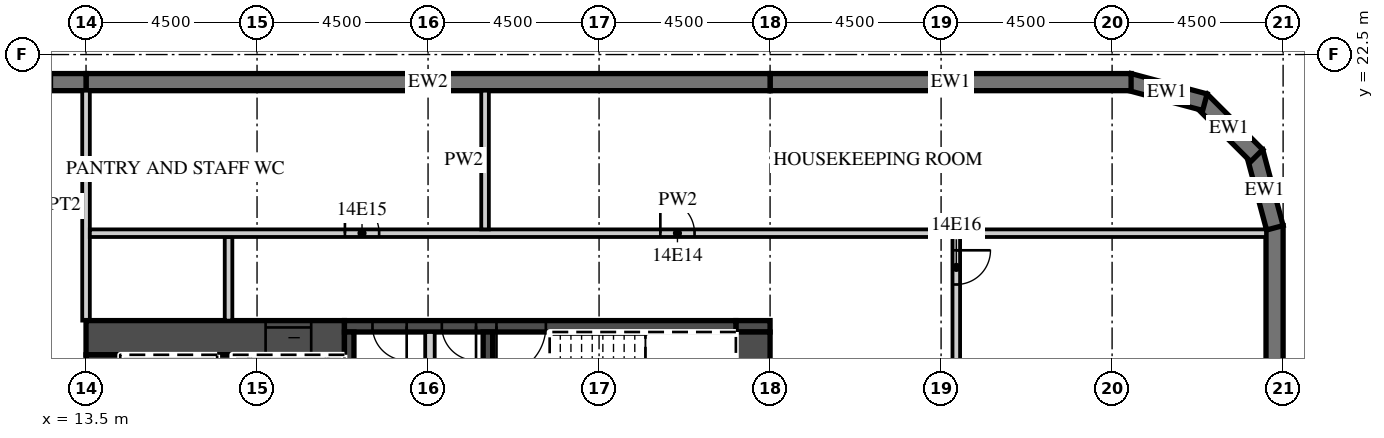
"""IFC4 building model, lengths in metres.
Left out: names, types, materials, properties, quantities, classifications, styles, units other than length and angle.
Written with IfcOpenShell. Run it as: python <this file> out.ifc"""

import sys

from ifc_helpers import new_model, si_unit, direction, frame, frame_2d, origin, place, context, subcontext, project, spatial, polyline, rectangle, outline, extrude, element, fill, save


model = new_model("IFC4")
c1 = context("Model", 3, precision=1e-05, world=origin(), true_north=direction((0.0, 1.0)))
c2 = subcontext(c1, "Body", "Model", "MODEL_VIEW")
j1 = project(units=[si_unit("LENGTHUNIT", "METRE"), si_unit("PLANEANGLEUNIT", "RADIAN")], contexts=[c1])
p1 = place(None, origin())
s1 = spatial("IfcSite", under=j1, at=p1, CompositionType="ELEMENT")
p2 = place(p1, origin())
s2 = spatial("IfcBuilding", under=s1, at=p2, CompositionType="ELEMENT")
p3 = place(p2, frame((0.0, 0.0, 76.5)))
s3 = spatial("IfcBuildingStorey", under=s2, at=p3, CompositionType="ELEMENT", Elevation=76.5)
p4 = place(p3, frame((44.775, -18.0, 0.0), z_axis=(0.0, 0.0, 1.0), x_axis=(0.0, 1.0, 0.0)))
e1 = element("IfcWall", 1, at=p4, inside=s3, PredefinedType="SOLIDWALL", context=c2, shape_type="SweptSolid", body=[
    extrude(rectangle(XDim=36.0, YDim=0.45, at=frame_2d((18.0, 0.0))), origin(), (0.0, 0.0, 1.0), 3.02),
])
p5 = place(p4, frame((3.9, 0.0, 0.45)))
e2 = element("IfcOpeningElement", 2, at=p5, cuts=e1, PredefinedType="OPENING", context=c2, shape_type="SweptSolid", body=[
    extrude(rectangle(XDim=3.3, YDim=2.25, at=frame_2d((1.65, 1.125))), frame((0.0, 0.235, 0.0), z_axis=(0.0, -1.0, 0.0), x_axis=(1.0, 0.0, 0.0)), (0.0, 0.0, 1.0), 0.47),
])
p6 = place(p4, frame((8.4, 0.0, 0.45)))
e3 = element("IfcOpeningElement", 3, at=p6, cuts=e1, PredefinedType="OPENING", context=c2, shape_type="SweptSolid", body=[
    extrude(rectangle(XDim=3.3, YDim=2.25, at=frame_2d((1.65, 1.125))), frame((0.0, 0.235, 0.0), z_axis=(0.0, -1.0, 0.0), x_axis=(1.0, 0.0, 0.0)), (0.0, 0.0, 1.0), 0.47),
])
p7 = place(p4, frame((12.9, 0.0, 0.45)))
e4 = element("IfcOpeningElement", 4, at=p7, cuts=e1, PredefinedType="OPENING", context=c2, shape_type="SweptSolid", body=[
    extrude(rectangle(XDim=3.3, YDim=2.25, at=frame_2d((1.65, 1.125))), frame((0.0, 0.235, 0.0), z_axis=(0.0, -1.0, 0.0), x_axis=(1.0, 0.0, 0.0)), (0.0, 0.0, 1.0), 0.47),
])
p8 = place(p3, frame((44.783, 17.942, 0.0), z_axis=(0.0, 0.0, 1.0), x_axis=(-0.25881466832, 0.965926999034, 0.0)))
e5 = element("IfcWall", 5, at=p8, inside=s3, PredefinedType="SOLIDWALL", context=c2, shape_type="SweptSolid", body=[
    extrude(outline(polyline([(0.0, -0.225), (2.071, -0.225), (1.95, 0.225), (0.121, 0.225), (0.0, -0.225)])), origin(), (0.0, 0.0, 1.0), 3.02),
])
p9 = place(p3, frame((44.305, 19.841, 0.0), z_axis=(0.0, 0.0, 1.0), x_axis=(-0.707106781187, 0.707106781187, 0.0)))
e6 = element("IfcWall", 6, at=p9, inside=s3, PredefinedType="SOLIDWALL", context=c2, shape_type="SweptSolid", body=[
    extrude(outline(polyline([(0.0, -0.225), (2.071, -0.225), (1.95, 0.225), (0.121, 0.225), (0.0, -0.225)])), origin(), (0.0, 0.0, 1.0), 3.02),
])
p10 = place(p3, frame((42.942, 21.247, 0.0), z_axis=(0.0, 0.0, 1.0), x_axis=(-0.965926999034, 0.25881466832, 0.0)))
e7 = element("IfcWall", 7, at=p10, inside=s3, PredefinedType="SOLIDWALL", context=c2, shape_type="SweptSolid", body=[
    extrude(outline(polyline([(-0.0, -0.225), (2.07, -0.225), (1.95, 0.225), (0.12, 0.225), (-0.0, -0.225)])), origin(), (0.0, 0.0, 1.0), 3.02),
])
p11 = place(p3, frame((41.0, 21.775, 0.0), z_axis=(0.0, 0.0, 1.0), x_axis=(-1.0, 0.0, 0.0)))
e8 = element("IfcWall", 8, at=p11, inside=s3, PredefinedType="SOLIDWALL", context=c2, shape_type="SweptSolid", body=[
    extrude(rectangle(XDim=9.5, YDim=0.45, at=frame_2d((4.75, 0.0))), origin(), (0.0, 0.0, 1.0), 3.02),
])
p12 = place(p3, frame((31.5, 21.775, 0.0), z_axis=(0.0, 0.0, 1.0), x_axis=(-1.0, 0.0, 0.0)))
e9 = element("IfcWall", 9, at=p12, inside=s3, PredefinedType="SOLIDWALL", context=c2, shape_type="SweptSolid", body=[
    extrude(rectangle(XDim=18.0, YDim=0.45, at=frame_2d((9.0, 0.0))), origin(), (0.0, 0.0, 1.0), 3.02),
])
p13 = place(p3, frame((13.5, 21.775, 0.0), z_axis=(0.0, 0.0, 1.0), x_axis=(-1.0, 0.0, 0.0)))
e10 = element("IfcWall", 10, at=p13, inside=s3, PredefinedType="SOLIDWALL", context=c2, shape_type="SweptSolid", body=[
    extrude(rectangle(XDim=54.5, YDim=0.45, at=frame_2d((27.25, 0.0))), origin(), (0.0, 0.0, 1.0), 3.02),
])
p14 = place(p13, frame((0.9, 0.0, 0.45)))
e11 = element("IfcOpeningElement", 11, at=p14, cuts=e10, PredefinedType="OPENING", context=c2, shape_type="SweptSolid", body=[
    extrude(rectangle(XDim=2.7, YDim=2.25, at=frame_2d((1.35, 1.125))), frame((0.0, 0.235, 0.0), z_axis=(0.0, -1.0, 0.0), x_axis=(1.0, 0.0, 0.0)), (0.0, 0.0, 1.0), 0.47),
])
p15 = place(p13, frame((5.4, 0.0, 0.45)))
e12 = element("IfcOpeningElement", 12, at=p15, cuts=e10, PredefinedType="OPENING", context=c2, shape_type="SweptSolid", body=[
    extrude(rectangle(XDim=2.7, YDim=2.25, at=frame_2d((1.35, 1.125))), frame((0.0, 0.235, 0.0), z_axis=(0.0, -1.0, 0.0), x_axis=(1.0, 0.0, 0.0)), (0.0, 0.0, 1.0), 0.47),
])
p16 = place(p13, frame((9.9, 0.0, 0.45)))
e13 = element("IfcOpeningElement", 13, at=p16, cuts=e10, PredefinedType="OPENING", context=c2, shape_type="SweptSolid", body=[
    extrude(rectangle(XDim=2.7, YDim=2.25, at=frame_2d((1.35, 1.125))), frame((0.0, 0.235, 0.0), z_axis=(0.0, -1.0, 0.0), x_axis=(1.0, 0.0, 0.0)), (0.0, 0.0, 1.0), 0.47),
])
p17 = place(p13, frame((14.4, 0.0, 0.45)))
e14 = element("IfcOpeningElement", 14, at=p17, cuts=e10, PredefinedType="OPENING", context=c2, shape_type="SweptSolid", body=[
    extrude(rectangle(XDim=2.7, YDim=2.25, at=frame_2d((1.35, 1.125))), frame((0.0, 0.235, 0.0), z_axis=(0.0, -1.0, 0.0), x_axis=(1.0, 0.0, 0.0)), (0.0, 0.0, 1.0), 0.47),
])
p18 = place(p13, frame((18.9, 0.0, 0.45)))
e15 = element("IfcOpeningElement", 15, at=p18, cuts=e10, PredefinedType="OPENING", context=c2, shape_type="SweptSolid", body=[
    extrude(rectangle(XDim=2.7, YDim=2.25, at=frame_2d((1.35, 1.125))), frame((0.0, 0.235, 0.0), z_axis=(0.0, -1.0, 0.0), x_axis=(1.0, 0.0, 0.0)), (0.0, 0.0, 1.0), 0.47),
])
p19 = place(p13, frame((23.4, 0.0, 0.45)))
e16 = element("IfcOpeningElement", 16, at=p19, cuts=e10, PredefinedType="OPENING", context=c2, shape_type="SweptSolid", body=[
    extrude(rectangle(XDim=2.7, YDim=2.25, at=frame_2d((1.35, 1.125))), frame((0.0, 0.235, 0.0), z_axis=(0.0, -1.0, 0.0), x_axis=(1.0, 0.0, 0.0)), (0.0, 0.0, 1.0), 0.47),
])
p20 = place(p13, frame((27.9, 0.0, 0.45)))
e17 = element("IfcOpeningElement", 17, at=p20, cuts=e10, PredefinedType="OPENING", context=c2, shape_type="SweptSolid", body=[
    extrude(rectangle(XDim=2.7, YDim=2.25, at=frame_2d((1.35, 1.125))), frame((0.0, 0.235, 0.0), z_axis=(0.0, -1.0, 0.0), x_axis=(1.0, 0.0, 0.0)), (0.0, 0.0, 1.0), 0.47),
])
p21 = place(p13, frame((32.4, 0.0, 0.45)))
e18 = element("IfcOpeningElement", 18, at=p21, cuts=e10, PredefinedType="OPENING", context=c2, shape_type="SweptSolid", body=[
    extrude(rectangle(XDim=2.7, YDim=2.25, at=frame_2d((1.35, 1.125))), frame((0.0, 0.235, 0.0), z_axis=(0.0, -1.0, 0.0), x_axis=(1.0, 0.0, 0.0)), (0.0, 0.0, 1.0), 0.47),
])
p22 = place(p13, frame((36.9, 0.0, 0.45)))
e19 = element("IfcOpeningElement", 19, at=p22, cuts=e10, PredefinedType="OPENING", context=c2, shape_type="SweptSolid", body=[
    extrude(rectangle(XDim=2.7, YDim=2.25, at=frame_2d((1.35, 1.125))), frame((0.0, 0.235, 0.0), z_axis=(0.0, -1.0, 0.0), x_axis=(1.0, 0.0, 0.0)), (0.0, 0.0, 1.0), 0.47),
])
p23 = place(p13, frame((41.4, 0.0, 0.45)))
e20 = element("IfcOpeningElement", 20, at=p23, cuts=e10, PredefinedType="OPENING", context=c2, shape_type="SweptSolid", body=[
    extrude(rectangle(XDim=2.7, YDim=2.25, at=frame_2d((1.35, 1.125))), frame((0.0, 0.235, 0.0), z_axis=(0.0, -1.0, 0.0), x_axis=(1.0, 0.0, 0.0)), (0.0, 0.0, 1.0), 0.47),
])
p24 = place(p13, frame((45.9, 0.0, 0.45)))
e21 = element("IfcOpeningElement", 21, at=p24, cuts=e10, PredefinedType="OPENING", context=c2, shape_type="SweptSolid", body=[
    extrude(rectangle(XDim=2.7, YDim=2.25, at=frame_2d((1.35, 1.125))), frame((0.0, 0.235, 0.0), z_axis=(0.0, -1.0, 0.0), x_axis=(1.0, 0.0, 0.0)), (0.0, 0.0, 1.0), 0.47),
])
p25 = place(p13, frame((50.4, 0.0, 0.45)))
e22 = element("IfcOpeningElement", 22, at=p25, cuts=e10, PredefinedType="OPENING", context=c2, shape_type="SweptSolid", body=[
    extrude(rectangle(XDim=2.7, YDim=2.25, at=frame_2d((1.35, 1.125))), frame((0.0, 0.235, 0.0), z_axis=(0.0, -1.0, 0.0), x_axis=(1.0, 0.0, 0.0)), (0.0, 0.0, 1.0), 0.47),
])
p26 = place(p3, frame((13.5, 15.5, 0.0), z_axis=(0.0, 0.0, 1.0), x_axis=(0.0, 1.0, 0.0)))
e23 = element("IfcWall", 23, at=p26, inside=s3, PredefinedType="PARTITIONING", context=c2, shape_type="SweptSolid", body=[
    extrude(rectangle(XDim=6.05, YDim=0.2, at=frame_2d((3.025, 0.0))), origin(), (0.0, 0.0, 1.0), 3.02),
])
p27 = place(p3, frame((13.5, 15.05, 0.0), z_axis=(0.0, 0.0, 1.0), x_axis=(1.0, 0.0, 0.0)))
e24 = element("IfcWall", 24, at=p27, inside=s3, PredefinedType="SHEAR", context=c2, shape_type="SweptSolid", body=[
    extrude(rectangle(XDim=6.8, YDim=0.9, at=frame_2d((3.4, 0.0))), origin(), (0.0, 0.0, 1.0), 3.02),
])
p28 = place(p27, frame((4.725, 0.0, 0.0)))
e25 = element("IfcOpeningElement", 25, at=p28, cuts=e24, PredefinedType="OPENING", context=c2, shape_type="SweptSolid", body=[
    extrude(rectangle(XDim=1.2, YDim=2.1, at=frame_2d((0.6, 1.05))), frame((0.0, 0.46, 0.0), z_axis=(0.0, -1.0, 0.0), x_axis=(1.0, 0.0, 0.0)), (0.0, 0.0, 1.0), 0.92),
])
p29 = place(p3, frame((30.6, 15.35, 0.0), z_axis=(0.0, 0.0, 1.0), x_axis=(1.0, 0.0, 0.0)))
e26 = element("IfcWall", 26, at=p29, inside=s3, PredefinedType="SHEAR", context=c2, shape_type="SweptSolid", body=[
    extrude(rectangle(XDim=0.9, YDim=0.3, at=frame_2d((0.45, 0.0))), origin(), (0.0, 0.0, 1.0), 3.02),
])
p30 = place(p3, frame((20.3, 15.35, 0.0), z_axis=(0.0, 0.0, 1.0), x_axis=(1.0, 0.0, 0.0)))
e27 = element("IfcWall", 27, at=p30, inside=s3, PredefinedType="SHEAR", context=c2, shape_type="SweptSolid", body=[
    extrude(rectangle(XDim=10.3, YDim=0.3, at=frame_2d((5.15, 0.0))), origin(), (0.0, 0.0, 1.0), 3.02),
])
p31 = place(p30, frame((4.0, 0.0, 0.0)))
e28 = element("IfcOpeningElement", 28, at=p31, cuts=e27, PredefinedType="OPENING", context=c2, shape_type="SweptSolid", body=[
    extrude(rectangle(XDim=1.3, YDim=2.1, at=frame_2d((0.65, 1.05))), frame((0.0, 0.16, 0.0), z_axis=(0.0, -1.0, 0.0), x_axis=(1.0, 0.0, 0.0)), (0.0, 0.0, 1.0), 0.32),
])
p32 = place(p30, frame((2.562, 0.0, 0.0)))
e29 = element("IfcOpeningElement", 29, at=p32, cuts=e27, PredefinedType="OPENING", context=c2, shape_type="SweptSolid", body=[
    extrude(rectangle(XDim=0.9, YDim=2.1, at=frame_2d((0.45, 1.05))), frame((0.0, 0.16, 0.0), z_axis=(0.0, -1.0, 0.0), x_axis=(1.0, 0.0, 0.0)), (0.0, 0.0, 1.0), 0.32),
])
p33 = place(p30, frame((0.738, 0.0, 0.0)))
e30 = element("IfcOpeningElement", 30, at=p33, cuts=e27, PredefinedType="OPENING", context=c2, shape_type="SweptSolid", body=[
    extrude(rectangle(XDim=0.9, YDim=2.1, at=frame_2d((0.45, 1.05))), frame((0.0, 0.16, 0.0), z_axis=(0.0, -1.0, 0.0), x_axis=(1.0, 0.0, 0.0)), (0.0, 0.0, 1.0), 0.32),
])
p34 = place(p3, frame((31.05, 2.4, 0.0), z_axis=(0.0, 0.0, 1.0), x_axis=(0.0, 1.0, 0.0)))
e31 = element("IfcWall", 31, at=p34, inside=s3, PredefinedType="SHEAR", context=c2, shape_type="SweptSolid", body=[
    extrude(rectangle(XDim=12.8, YDim=0.9, at=frame_2d((6.4, 0.0))), origin(), (0.0, 0.0, 1.0), 3.02),
])
p35 = place(p34, frame((0.2, 0.0, 0.0)))
e32 = element("IfcOpeningElement", 32, at=p35, cuts=e31, PredefinedType="OPENING", context=c2, shape_type="SweptSolid", body=[
    extrude(rectangle(XDim=1.1, YDim=2.1, at=frame_2d((0.55, 1.05))), frame((0.0, 0.46, 0.0), z_axis=(0.0, -1.0, 0.0), x_axis=(1.0, 0.0, 0.0)), (0.0, 0.0, 1.0), 0.92),
])
p36 = place(p3, frame((13.95, 2.4, 0.0), z_axis=(0.0, 0.0, 1.0), x_axis=(0.0, 1.0, 0.0)))
e33 = element("IfcWall", 33, at=p36, inside=s3, PredefinedType="SHEAR", context=c2, shape_type="SweptSolid", body=[
    extrude(rectangle(XDim=12.2, YDim=0.9, at=frame_2d((6.1, 0.0))), origin(), (0.0, 0.0, 1.0), 3.02),
])
p37 = place(p3, frame((17.15, 8.8, 0.0), z_axis=(0.0, 0.0, 1.0), x_axis=(0.0, 1.0, 0.0)))
e34 = element("IfcWall", 34, at=p37, inside=s3, PredefinedType="SHEAR", context=c2, shape_type="SweptSolid", body=[
    extrude(rectangle(XDim=5.8, YDim=0.4, at=frame_2d((2.9, 0.0))), origin(), (0.0, 0.0, 1.0), 3.02),
])
for number, where, z_axis, x_axis in (
    (35, (20.425, 11.95, 0.0), (0.0, 0.0, 1.0), (0.0, 1.0, 0.0)),
    (36, (24.075, 11.95, 0.0), (0.0, 0.0, 1.0), (0.0, 1.0, 0.0)),
):
    element("IfcWall", number, at=place(p3, frame(where, z_axis=z_axis, x_axis=x_axis)), inside=s3, PredefinedType="SHEAR", context=c2, shape_type="SweptSolid", body=[
        extrude(rectangle(XDim=3.25, YDim=0.25, at=frame_2d((1.625, 0.0))), origin(), (0.0, 0.0, 1.0), 3.02),
    ])
p38 = place(p3, frame((22.55, 11.95, 0.0), z_axis=(0.0, 0.0, 1.0), x_axis=(0.0, 1.0, 0.0)))
e37 = element("IfcWall", 37, at=p38, inside=s3, PredefinedType="PARTITIONING", context=c2, shape_type="SweptSolid", body=[
    extrude(rectangle(XDim=3.25, YDim=0.25, at=frame_2d((1.625, 0.0))), origin(), (0.0, 0.0, 1.0), 3.02),
])
p39 = place(p3, frame((17.25, 15.5, 0.0), z_axis=(0.0, 0.0, 1.0), x_axis=(0.0, 1.0, 0.0)))
e38 = element("IfcWall", 38, at=p39, inside=s3, PredefinedType="PARTITIONING", context=c2, shape_type="SweptSolid", body=[
    extrude(rectangle(XDim=2.2, YDim=0.2, at=frame_2d((1.1, 0.0))), origin(), (0.0, 0.0, 1.0), 3.02),
])
p40 = place(p3, frame((36.4, 1.75, 0.0), z_axis=(0.0, 0.0, 1.0), x_axis=(0.0, 1.0, 0.0)))
e39 = element("IfcWall", 39, at=p40, inside=s3, PredefinedType="PARTITIONING", context=c2, shape_type="SweptSolid", body=[
    extrude(rectangle(XDim=15.95, YDim=0.2, at=frame_2d((7.975, 0.0))), origin(), (0.0, 0.0, 1.0), 3.02),
])
p41 = place(p40, frame((14.7, 0.0, 0.0)))
e40 = element("IfcOpeningElement", 40, at=p41, cuts=e39, PredefinedType="OPENING", context=c2, shape_type="SweptSolid", body=[
    extrude(rectangle(XDim=0.9, YDim=2.1, at=frame_2d((0.45, 1.05))), frame((0.0, 0.11, 0.0), z_axis=(0.0, -1.0, 0.0), x_axis=(1.0, 0.0, 0.0)), (0.0, 0.0, 1.0), 0.22),
])
p42 = place(p3, frame((13.6, 17.8, 0.0), z_axis=(0.0, 0.0, 1.0), x_axis=(1.0, 0.0, 0.0)))
e41 = element("IfcWall", 41, at=p42, inside=s3, PredefinedType="PARTITIONING", context=c2, shape_type="SweptSolid", body=[
    extrude(rectangle(XDim=30.95, YDim=0.2, at=frame_2d((15.475, 0.0))), origin(), (0.0, 0.0, 1.0), 3.02),
])
p43 = place(p42, frame((15.012, 0.0, 0.0)))
e42 = element("IfcOpeningElement", 42, at=p43, cuts=e41, PredefinedType="OPENING", context=c2, shape_type="SweptSolid", body=[
    extrude(rectangle(XDim=0.9, YDim=2.1, at=frame_2d((0.45, 1.05))), frame((0.0, 0.11, 0.0), z_axis=(0.0, -1.0, 0.0), x_axis=(1.0, 0.0, 0.0)), (0.0, 0.0, 1.0), 0.22),
])
p44 = place(p42, frame((6.712, 0.0, 0.0)))
e43 = element("IfcOpeningElement", 43, at=p44, cuts=e41, PredefinedType="OPENING", context=c2, shape_type="SweptSolid", body=[
    extrude(rectangle(XDim=0.9, YDim=2.1, at=frame_2d((0.45, 1.05))), frame((0.0, 0.11, 0.0), z_axis=(0.0, -1.0, 0.0), x_axis=(1.0, 0.0, 0.0)), (0.0, 0.0, 1.0), 0.22),
])
p45 = place(p3, frame((24.0, 17.9, 0.0), z_axis=(0.0, 0.0, 1.0), x_axis=(0.0, 1.0, 0.0)))
e44 = element("IfcWall", 44, at=p45, inside=s3, PredefinedType="PARTITIONING", context=c2, shape_type="SweptSolid", body=[
    extrude(rectangle(XDim=3.65, YDim=0.2, at=frame_2d((1.825, 0.0))), origin(), (0.0, 0.0, 1.0), 3.02),
])
p46 = place(p28, origin())
e45 = element("IfcDoor", 45, at=p46, inside=s3, OperationType="SLIDING_TO_LEFT", PredefinedType="DOOR", context=c2, shape_type="SweptSolid", body=[
    extrude(rectangle(XDim=1.2, YDim=2.1, at=frame_2d((0.6, 1.05))), frame((0.0, 0.025, 0.0), z_axis=(0.0, -1.0, 0.0), x_axis=(1.0, 0.0, 0.0)), (0.0, 0.0, 1.0), 0.05),
])
fill(e25, e45)
p47 = place(p31, origin())
e46 = element("IfcDoor", 46, at=p47, inside=s3, OperationType="SINGLE_SWING_LEFT", PredefinedType="DOOR", context=c2, shape_type="SweptSolid", body=[
    extrude(rectangle(XDim=1.3, YDim=2.1, at=frame_2d((0.65, 1.05))), frame((0.0, 0.025, 0.0), z_axis=(0.0, -1.0, 0.0), x_axis=(1.0, 0.0, 0.0)), (0.0, 0.0, 1.0), 0.05),
])
fill(e28, e46)
p48 = place(p32, origin())
e47 = element("IfcDoor", 47, at=p48, inside=s3, OperationType="SINGLE_SWING_RIGHT", PredefinedType="DOOR", context=c2, shape_type="SweptSolid", body=[
    extrude(rectangle(XDim=0.9, YDim=2.1, at=frame_2d((0.45, 1.05))), frame((0.0, 0.025, 0.0), z_axis=(0.0, -1.0, 0.0), x_axis=(1.0, 0.0, 0.0)), (0.0, 0.0, 1.0), 0.05),
])
fill(e29, e47)
p49 = place(p33, origin())
e48 = element("IfcDoor", 48, at=p49, inside=s3, OperationType="SINGLE_SWING_RIGHT", PredefinedType="DOOR", context=c2, shape_type="SweptSolid", body=[
    extrude(rectangle(XDim=0.9, YDim=2.1, at=frame_2d((0.45, 1.05))), frame((0.0, 0.025, 0.0), z_axis=(0.0, -1.0, 0.0), x_axis=(1.0, 0.0, 0.0)), (0.0, 0.0, 1.0), 0.05),
])
fill(e30, e48)
p50 = place(p43, origin())
e49 = element("IfcDoor", 49, at=p50, inside=s3, OperationType="SINGLE_SWING_LEFT", PredefinedType="DOOR", context=c2, shape_type="SweptSolid", body=[
    extrude(rectangle(XDim=0.9, YDim=2.1, at=frame_2d((0.45, 1.05))), frame((0.0, 0.025, 0.0), z_axis=(0.0, -1.0, 0.0), x_axis=(1.0, 0.0, 0.0)), (0.0, 0.0, 1.0), 0.05),
])
fill(e42, e49)
p51 = place(p44, origin())
e50 = element("IfcDoor", 50, at=p51, inside=s3, OperationType="SINGLE_SWING_LEFT", PredefinedType="DOOR", context=c2, shape_type="SweptSolid", body=[
    extrude(rectangle(XDim=0.9, YDim=2.1, at=frame_2d((0.45, 1.05))), frame((0.0, 0.025, 0.0), z_axis=(0.0, -1.0, 0.0), x_axis=(1.0, 0.0, 0.0)), (0.0, 0.0, 1.0), 0.05),
])
fill(e43, e50)
p52 = place(p41, origin())
e51 = element("IfcDoor", 51, at=p52, inside=s3, OperationType="SINGLE_SWING_RIGHT", PredefinedType="DOOR", context=c2, shape_type="SweptSolid", body=[
    extrude(rectangle(XDim=0.9, YDim=2.1, at=frame_2d((0.45, 1.05))), frame((0.0, 0.025, 0.0), z_axis=(0.0, -1.0, 0.0), x_axis=(1.0, 0.0, 0.0)), (0.0, 0.0, 1.0), 0.05),
])
fill(e40, e51)
save(model, sys.argv[1])
